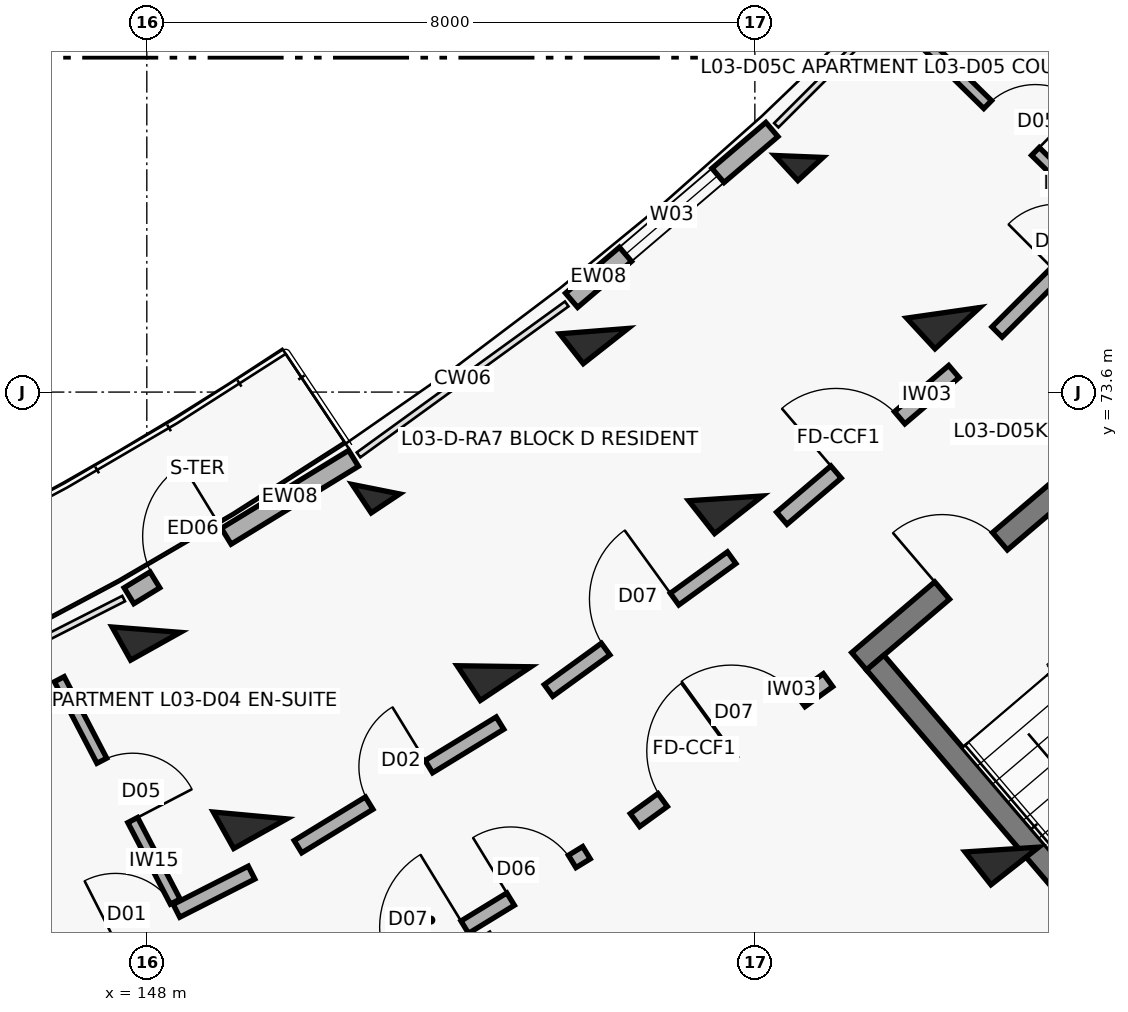
"""IFC4 building model, lengths in metres.
Left out: names, types, materials, properties, quantities, classifications, styles, units other than length and angle.
Written with IfcOpenShell. Run it as: python <this file> out.ifc"""

import sys

from ifc_helpers import new_model, si_unit, direction, frame, frame_2d, origin, origin_2d, place, context, subcontext, project, spatial, rectangle, extrude, element, fill, save


model = new_model("IFC4")
c1 = context("Model", 3, precision=1e-05, world=origin(), true_north=direction((0.0, 1.0)))
c2 = subcontext(c1, "Body", "Model", "MODEL_VIEW")
j1 = project(units=[si_unit("LENGTHUNIT", "METRE"), si_unit("PLANEANGLEUNIT", "RADIAN")], contexts=[c1])
p1 = place(None, origin())
s1 = spatial("IfcSite", under=j1, at=p1, CompositionType="ELEMENT")
p2 = place(p1, origin())
s2 = spatial("IfcBuilding", under=s1, at=p2, CompositionType="ELEMENT")
p3 = place(p2, frame((0.0, 0.0, 11.2)))
s3 = spatial("IfcBuildingStorey", under=s2, at=p3, CompositionType="ELEMENT", Elevation=11.2)
p4 = place(p3, frame((147.992, 70.474, 0.0), z_axis=(0.0, 0.0, 1.0), x_axis=(0.487859659139, -0.87292207727, 0.0)))
e1 = element("IfcColumn", 1, at=p4, inside=s3, PredefinedType="COLUMN", context=c2, shape_type="SweptSolid", body=[
    extrude(rectangle(XDim=0.5, YDim=0.75, at=origin_2d()), origin(), (0.0, 0.0, 1.0), 3.1),
])
p5 = place(p3, frame((149.358, 68.03, 0.0), z_axis=(0.0, 0.0, 1.0), x_axis=(0.487859659139, -0.87292207727, 0.0)))
e2 = element("IfcColumn", 2, at=p5, inside=s3, PredefinedType="COLUMN", context=c2, shape_type="SweptSolid", body=[
    extrude(rectangle(XDim=0.55, YDim=0.8, at=origin_2d()), origin(), (0.0, 0.0, 1.0), 3.1),
])
p6 = place(p3, frame((151.015, 72.322, 0.0), z_axis=(0.0, 0.0, 1.0), x_axis=(0.554844427448, -0.83195412213, 0.0)))
e3 = element("IfcColumn", 3, at=p6, inside=s3, PredefinedType="COLUMN", context=c2, shape_type="SweptSolid", body=[
    extrude(rectangle(XDim=0.45, YDim=0.45, at=origin_2d()), origin(), (0.0, 0.0, 1.0), 3.1),
])
p7 = place(p3, frame((152.568, 69.993, 0.0), z_axis=(0.0, 0.0, 1.0), x_axis=(0.554844427448, -0.83195412213, 0.0)))
e4 = element("IfcColumn", 4, at=p7, inside=s3, PredefinedType="COLUMN", context=c2, shape_type="SweptSolid", body=[
    extrude(rectangle(XDim=0.55, YDim=0.8, at=origin_2d()), origin(), (0.0, 0.0, 1.0), 3.1),
])
p8 = place(p3, frame((153.883, 74.402, 0.0), z_axis=(0.0, 0.0, 1.0), x_axis=(0.618408395358, -0.785856893175, 0.0)))
e5 = element("IfcColumn", 5, at=p8, inside=s3, PredefinedType="COLUMN", context=c2, shape_type="SweptSolid", body=[
    extrude(rectangle(XDim=0.5, YDim=0.75, at=origin_2d()), origin(), (0.0, 0.0, 1.0), 3.1),
])
for number, where, z_axis, x_axis in (
    (6, (155.614, 72.202, 0.0), (0.0, 0.0, 1.0), (0.618, -0.786, 0.0)),
    (7, (159.25, 67.581, 0.0), (0.0, 0.0, 1.0), (0.618, -0.786, 0.0)),
):
    element("IfcColumn", number, at=place(p3, frame(where, z_axis=z_axis, x_axis=x_axis)), inside=s3, PredefinedType="COLUMN", context=c2, shape_type="SweptSolid", body=[
        extrude(rectangle(XDim=0.55, YDim=0.8, at=origin_2d()), origin(), (0.0, 0.0, 1.0), 3.1),
    ])
p9 = place(p3, frame((156.579, 76.701, 0.0), z_axis=(0.0, 0.0, 1.0), x_axis=(0.678159669868, -0.73491459515, 0.0)))
e8 = element("IfcColumn", 8, at=p9, inside=s3, PredefinedType="COLUMN", context=c2, shape_type="SweptSolid", body=[
    extrude(rectangle(XDim=0.45, YDim=0.45, at=origin_2d()), origin(), (0.0, 0.0, 1.0), 3.1),
])
p10 = place(p3, frame((158.477, 74.643, 0.0), z_axis=(0.0, 0.0, 1.0), x_axis=(0.678159669868, -0.73491459515, 0.0)))
e9 = element("IfcColumn", 9, at=p10, inside=s3, PredefinedType="COLUMN", context=c2, shape_type="SweptSolid", body=[
    extrude(rectangle(XDim=0.55, YDim=0.8, at=origin_2d()), origin(), (0.0, 0.0, 1.0), 3.1),
])
p11 = place(p3, frame((147.765, 70.921, 0.0), z_axis=(0.0, 0.0, 1.0), x_axis=(0.85310231885, 0.521743647371, 0.0)))
e10 = element("IfcWall", 10, at=p11, inside=s3, PredefinedType="SOLIDWALL", context=c2, shape_type="SweptSolid", body=[
    extrude(rectangle(XDim=3.464, YDim=0.245, at=frame_2d((1.732, 0.0))), origin(), (0.0, 0.0, 1.0), 2.25),
])
p12 = place(p11, frame((0.4, 0.0, 0.0)))
e11 = element("IfcOpeningElement", 11, at=p12, cuts=e10, PredefinedType="OPENING", context=c2, shape_type="SweptSolid", body=[
    extrude(rectangle(XDim=1.1, YDim=2.15, at=frame_2d((0.55, 1.075))), frame((0.0, 0.133, 0.0), z_axis=(0.0, -1.0, 0.0), x_axis=(1.0, 0.0, 0.0)), (0.0, 0.0, 1.0), 0.265),
])
p13 = place(p3, frame((153.589, 74.808, 0.0), z_axis=(0.0, 0.0, 1.0), x_axis=(0.760985425115, 0.648768974876, 0.0)))
e12 = element("IfcWall", 12, at=p13, inside=s3, PredefinedType="SOLIDWALL", context=c2, shape_type="SweptSolid", body=[
    extrude(rectangle(XDim=3.464, YDim=0.245, at=frame_2d((1.732, 0.0))), origin(), (0.0, 0.0, 1.0), 2.25),
])
p14 = place(p13, frame((0.932, 0.0, 0.32)))
e13 = element("IfcOpeningElement", 13, at=p14, cuts=e12, PredefinedType="OPENING", context=c2, shape_type="SweptSolid", body=[
    extrude(rectangle(XDim=1.6, YDim=1.5, at=frame_2d((0.8, 0.75))), frame((0.0, 0.133, 0.0), z_axis=(0.0, -1.0, 0.0), x_axis=(1.0, 0.0, 0.0)), (0.0, 0.0, 1.0), 0.265),
])
p15 = place(p3, frame((159.262, 79.041, 0.0), z_axis=(0.0, 0.0, 1.0), x_axis=(0.733738684326, -0.679431779595, 0.0)))
e14 = element("IfcWall", 14, at=p15, inside=s3, PredefinedType="SOLIDWALL", context=c2, shape_type="SweptSolid", body=[
    extrude(rectangle(XDim=8.2, YDim=0.265, at=frame_2d((4.1, 0.0))), origin(), (0.0, 0.0, 1.0), 2.08),
])
p16 = place(p15, frame((3.59, 0.0, 0.75)))
e15 = element("IfcOpeningElement", 15, at=p16, cuts=e14, PredefinedType="OPENING", context=c2, shape_type="SweptSolid", body=[
    extrude(rectangle(XDim=1.35, YDim=1.35, at=frame_2d((0.675, 0.675))), frame((0.0, 0.142, 0.0), z_axis=(0.0, -1.0, 0.0), x_axis=(1.0, 0.0, 0.0)), (0.0, 0.0, 1.0), 0.285),
])
p17 = place(p3, frame((157.372, 70.058, 0.0), z_axis=(0.0, 0.0, 1.0), x_axis=(0.760990583254, 0.648762924495, 0.0)))
e16 = element("IfcWall", 16, at=p17, inside=s3, PredefinedType="SHEAR", context=c2, shape_type="SweptSolid", body=[
    extrude(rectangle(XDim=3.87, YDim=0.3, at=frame_2d((1.935, 0.0))), origin(), (0.0, 0.0, 1.0), 3.1),
])
p18 = place(p17, frame((1.435, 0.0, 0.0)))
e17 = element("IfcOpeningElement", 17, at=p18, cuts=e16, PredefinedType="OPENING", context=c2, shape_type="SweptSolid", body=[
    extrude(rectangle(XDim=1.0, YDim=2.15, at=frame_2d((0.5, 1.075))), frame((0.0, 0.16, 0.0), z_axis=(0.0, -1.0, 0.0), x_axis=(1.0, 0.0, 0.0)), (0.0, 0.0, 1.0), 0.32),
])
p19 = place(p3, frame((157.583, 70.041, 0.0), z_axis=(0.0, 0.0, 1.0), x_axis=(0.648762810187, -0.760990680704, 0.0)))
e18 = element("IfcWall", 18, at=p19, inside=s3, PredefinedType="SHEAR", context=c2, shape_type="SweptSolid", body=[
    extrude(rectangle(XDim=7.69, YDim=0.3, at=frame_2d((3.845, 0.0))), origin(), (0.0, 0.0, 1.0), 3.1),
])
p20 = place(p3, frame((146.6, 65.865, 0.0), z_axis=(0.0, 0.0, 1.0), x_axis=(0.891414101388, 0.453189695212, 0.0)))
e19 = element("IfcWall", 19, at=p20, inside=s3, PredefinedType="SOLIDWALL", context=c2, shape_type="SweptSolid", body=[
    extrude(rectangle(XDim=3.116, YDim=0.19, at=frame_2d((1.558, 0.0))), origin(), (0.0, 0.0, 1.0), 2.08),
])
p21 = place(p20, frame((1.108, 0.0, 0.0)))
e20 = element("IfcOpeningElement", 20, at=p21, cuts=e19, PredefinedType="OPENING", context=c2, shape_type="SweptSolid", body=[
    extrude(rectangle(XDim=0.9, YDim=2.1, at=frame_2d((0.45, 1.05))), frame((0.0, 0.105, 0.0), z_axis=(0.0, -1.0, 0.0), x_axis=(1.0, 0.0, 0.0)), (0.0, 0.0, 1.0), 0.21),
])
p22 = place(p3, frame((146.849, 69.822, 0.0), z_axis=(0.0, 0.0, 1.0), x_axis=(0.462242343884, -0.886753638572, 0.0)))
e21 = element("IfcWall", 21, at=p22, inside=s3, PredefinedType="PARTITIONING", context=c2, shape_type="SweptSolid", body=[
    extrude(rectangle(XDim=3.3, YDim=0.145, at=frame_2d((1.65, 0.0))), origin(), (0.0, 0.0, 1.0), 2.08),
])
p23 = place(p22, frame((1.21, 0.0, 0.0)))
e22 = element("IfcOpeningElement", 22, at=p23, cuts=e21, PredefinedType="OPENING", context=c2, shape_type="SweptSolid", body=[
    extrude(rectangle(XDim=0.88, YDim=2.1, at=frame_2d((0.44, 1.05))), frame((0.0, 0.083, 0.0), z_axis=(0.0, -1.0, 0.0), x_axis=(1.0, 0.0, 0.0)), (0.0, 0.0, 1.0), 0.165),
])
p24 = place(p3, frame((150.989, 65.829, 0.0), z_axis=(0.0, 0.0, 1.0), x_axis=(0.853090237845, 0.521763400492, 0.0)))
e23 = element("IfcWall", 23, at=p24, inside=s3, PredefinedType="SOLIDWALL", context=c2, shape_type="SweptSolid", body=[
    extrude(rectangle(XDim=3.277, YDim=0.19, at=frame_2d((1.638, 0.0))), origin(), (0.0, 0.0, 1.0), 2.08),
])
p25 = place(p24, frame((0.28, 0.0, 0.0)))
e24 = element("IfcOpeningElement", 24, at=p25, cuts=e23, PredefinedType="OPENING", context=c2, shape_type="SweptSolid", body=[
    extrude(rectangle(XDim=1.12, YDim=2.15, at=frame_2d((0.56, 1.075))), frame((0.0, 0.105, 0.0), z_axis=(0.0, -1.0, 0.0), x_axis=(1.0, 0.0, 0.0)), (0.0, 0.0, 1.0), 0.21),
])
p26 = place(p24, frame((2.107, 0.0, 0.0)))
e25 = element("IfcOpeningElement", 25, at=p26, cuts=e23, PredefinedType="OPENING", context=c2, shape_type="SweptSolid", body=[
    extrude(rectangle(XDim=0.95, YDim=2.1, at=frame_2d((0.475, 1.05))), frame((0.0, 0.105, 0.0), z_axis=(0.0, -1.0, 0.0), x_axis=(1.0, 0.0, 0.0)), (0.0, 0.0, 1.0), 0.21),
])
p27 = place(p3, frame((149.989, 67.619, 0.0), z_axis=(0.0, 0.0, 1.0), x_axis=(0.853121049608, 0.5217130195, 0.0)))
e26 = element("IfcWall", 26, at=p27, inside=s3, PredefinedType="SOLIDWALL", context=c2, shape_type="SweptSolid", body=[
    extrude(rectangle(XDim=3.116, YDim=0.19, at=frame_2d((1.558, 0.0))), origin(), (0.0, 0.0, 1.0), 2.08),
])
p28 = place(p27, frame((1.098, 0.0, 0.0)))
e27 = element("IfcOpeningElement", 27, at=p28, cuts=e26, PredefinedType="OPENING", context=c2, shape_type="SweptSolid", body=[
    extrude(rectangle(XDim=0.92, YDim=2.1, at=frame_2d((0.46, 1.05))), frame((0.0, 0.105, 0.0), z_axis=(0.0, -1.0, 0.0), x_axis=(1.0, 0.0, 0.0)), (0.0, 0.0, 1.0), 0.21),
])
p29 = place(p3, frame((154.423, 67.968, 0.0), z_axis=(0.0, 0.0, 1.0), x_axis=(0.809516127005, 0.587097641043, 0.0)))
e28 = element("IfcWall", 28, at=p29, inside=s3, PredefinedType="SOLIDWALL", context=c2, shape_type="SweptSolid", body=[
    extrude(rectangle(XDim=3.137, YDim=0.21, at=frame_2d((1.569, 0.0))), origin(), (0.0, 0.0, 1.0), 2.08),
])
p30 = place(p29, frame((0.45, 0.0, 0.0)))
e29 = element("IfcOpeningElement", 29, at=p30, cuts=e28, PredefinedType="OPENING", context=c2, shape_type="SweptSolid", body=[
    extrude(rectangle(XDim=1.1, YDim=2.15, at=frame_2d((0.55, 1.075))), frame((0.0, 0.115, 0.0), z_axis=(0.0, -1.0, 0.0), x_axis=(1.0, 0.0, 0.0)), (0.0, 0.0, 1.0), 0.23),
])
p31 = place(p29, frame((1.567, 0.0, 0.0)))
e30 = element("IfcOpeningElement", 30, at=p31, cuts=e28, PredefinedType="OPENING", context=c2, shape_type="SweptSolid", body=[
    extrude(rectangle(XDim=1.12, YDim=2.15, at=frame_2d((0.56, 1.075))), frame((0.0, 0.115, 0.0), z_axis=(0.0, -1.0, 0.0), x_axis=(1.0, 0.0, 0.0)), (0.0, 0.0, 1.0), 0.23),
])
p32 = place(p3, frame((153.285, 69.674, 0.0), z_axis=(0.0, 0.0, 1.0), x_axis=(0.809505174959, 0.587112741911, 0.0)))
e31 = element("IfcWall", 31, at=p32, inside=s3, PredefinedType="SOLIDWALL", context=c2, shape_type="SweptSolid", body=[
    extrude(rectangle(XDim=2.976, YDim=0.19, at=frame_2d((1.488, 0.0))), origin(), (0.0, 0.0, 1.0), 2.08),
])
p33 = place(p32, frame((0.928, 0.0, 0.0)))
e32 = element("IfcOpeningElement", 32, at=p33, cuts=e31, PredefinedType="OPENING", context=c2, shape_type="SweptSolid", body=[
    extrude(rectangle(XDim=1.12, YDim=2.15, at=frame_2d((0.56, 1.075))), frame((0.0, 0.105, 0.0), z_axis=(0.0, -1.0, 0.0), x_axis=(1.0, 0.0, 0.0)), (0.0, 0.0, 1.0), 0.21),
])
p34 = place(p3, frame((156.354, 71.94, 0.0), z_axis=(0.0, 0.0, 1.0), x_axis=(0.760991187621, 0.648762215579, 0.0)))
e33 = element("IfcWall", 33, at=p34, inside=s3, PredefinedType="SOLIDWALL", context=c2, shape_type="SweptSolid", body=[
    extrude(rectangle(XDim=2.976, YDim=0.21, at=frame_2d((1.488, 0.0))), origin(), (0.0, 0.0, 1.0), 2.08),
])
p35 = place(p34, frame((0.938, 0.0, 0.0)))
e34 = element("IfcOpeningElement", 34, at=p35, cuts=e33, PredefinedType="OPENING", context=c2, shape_type="SweptSolid", body=[
    extrude(rectangle(XDim=1.1, YDim=2.15, at=frame_2d((0.55, 1.075))), frame((0.0, 0.115, 0.0), z_axis=(0.0, -1.0, 0.0), x_axis=(1.0, 0.0, 0.0)), (0.0, 0.0, 1.0), 0.23),
])
p36 = place(p3, frame((159.186, 74.39, 0.0), z_axis=(0.0, 0.0, 1.0), x_axis=(0.70773330139, 0.706479705373, 0.0)))
e35 = element("IfcWall", 35, at=p36, inside=s3, PredefinedType="SOLIDWALL", context=c2, shape_type="SweptSolid", body=[
    extrude(rectangle(XDim=3.116, YDim=0.19, at=frame_2d((1.558, 0.0))), origin(), (0.0, 0.0, 1.0), 2.08),
])
p37 = place(p36, frame((1.108, 0.0, 0.0)))
e36 = element("IfcOpeningElement", 36, at=p37, cuts=e35, PredefinedType="OPENING", context=c2, shape_type="SweptSolid", body=[
    extrude(rectangle(XDim=0.9, YDim=2.1, at=frame_2d((0.45, 1.05))), frame((0.0, 0.105, 0.0), z_axis=(0.0, -1.0, 0.0), x_axis=(1.0, 0.0, 0.0)), (0.0, 0.0, 1.0), 0.21),
])
p38 = place(p3, frame((158.2, 78.23, 0.0), z_axis=(0.0, 0.0, 1.0), x_axis=(0.713587506757, -0.700566106945, 0.0)))
e37 = element("IfcWall", 37, at=p38, inside=s3, PredefinedType="PARTITIONING", context=c2, shape_type="SweptSolid", body=[
    extrude(rectangle(XDim=3.3, YDim=0.145, at=frame_2d((1.65, 0.0))), origin(), (0.0, 0.0, 1.0), 2.08),
])
p39 = place(p38, frame((1.21, 0.0, 0.0)))
e38 = element("IfcOpeningElement", 38, at=p39, cuts=e37, PredefinedType="OPENING", context=c2, shape_type="SweptSolid", body=[
    extrude(rectangle(XDim=0.88, YDim=2.1, at=frame_2d((0.44, 1.05))), frame((0.0, 0.083, 0.0), z_axis=(0.0, -1.0, 0.0), x_axis=(1.0, 0.0, 0.0)), (0.0, 0.0, 1.0), 0.165),
])
p40 = place(p12, origin())
e39 = element("IfcDoor", 39, at=p40, inside=s3, OperationType="SINGLE_SWING_RIGHT", PredefinedType="DOOR", context=c2, shape_type="SweptSolid", body=[
    extrude(rectangle(XDim=1.1, YDim=2.15, at=frame_2d((0.55, 1.075))), frame((0.0, 0.025, 0.0), z_axis=(0.0, -1.0, 0.0), x_axis=(1.0, 0.0, 0.0)), (0.0, 0.0, 1.0), 0.05),
])
fill(e11, e39)
p41 = place(p14, origin())
e40 = element("IfcWindow", 40, at=p41, inside=s3, PartitioningType="DOUBLE_PANEL_VERTICAL", PredefinedType="WINDOW", context=c2, shape_type="SweptSolid", body=[
    extrude(rectangle(XDim=1.6, YDim=1.5, at=frame_2d((0.8, 0.75))), frame((0.0, 0.03, 0.0), z_axis=(0.0, -1.0, 0.0), x_axis=(1.0, 0.0, 0.0)), (0.0, 0.0, 1.0), 0.06),
])
fill(e13, e40)
p42 = place(p18, origin())
e41 = element("IfcDoor", 41, at=p42, inside=s3, OperationType="SINGLE_SWING_LEFT", PredefinedType="DOOR", context=c2, shape_type="SweptSolid", body=[
    extrude(rectangle(XDim=1.0, YDim=2.15, at=frame_2d((0.5, 1.075))), frame((0.0, 0.025, 0.0), z_axis=(0.0, -1.0, 0.0), x_axis=(1.0, 0.0, 0.0)), (0.0, 0.0, 1.0), 0.05),
])
fill(e17, e41)
p43 = place(p21, origin())
e42 = element("IfcDoor", 42, at=p43, inside=s3, OperationType="SINGLE_SWING_LEFT", PredefinedType="DOOR", context=c2, shape_type="SweptSolid", body=[
    extrude(rectangle(XDim=0.9, YDim=2.1, at=frame_2d((0.45, 1.05))), frame((0.0, 0.025, 0.0), z_axis=(0.0, -1.0, 0.0), x_axis=(1.0, 0.0, 0.0)), (0.0, 0.0, 1.0), 0.05),
])
fill(e20, e42)
p44 = place(p23, origin())
e43 = element("IfcDoor", 43, at=p44, inside=s3, OperationType="SINGLE_SWING_RIGHT", PredefinedType="DOOR", context=c2, shape_type="SweptSolid", body=[
    extrude(rectangle(XDim=0.88, YDim=2.1, at=frame_2d((0.44, 1.05))), frame((0.0, 0.025, 0.0), z_axis=(0.0, -1.0, 0.0), x_axis=(1.0, 0.0, 0.0)), (0.0, 0.0, 1.0), 0.05),
])
fill(e22, e43)
p45 = place(p25, origin())
e44 = element("IfcDoor", 44, at=p45, inside=s3, OperationType="SINGLE_SWING_RIGHT", PredefinedType="DOOR", context=c2, shape_type="SweptSolid", body=[
    extrude(rectangle(XDim=1.12, YDim=2.15, at=frame_2d((0.56, 1.075))), frame((0.0, 0.025, 0.0), z_axis=(0.0, -1.0, 0.0), x_axis=(1.0, 0.0, 0.0)), (0.0, 0.0, 1.0), 0.05),
])
fill(e24, e44)
p46 = place(p26, origin())
e45 = element("IfcDoor", 45, at=p46, inside=s3, OperationType="SINGLE_SWING_LEFT", PredefinedType="DOOR", context=c2, shape_type="SweptSolid", body=[
    extrude(rectangle(XDim=0.95, YDim=2.1, at=frame_2d((0.475, 1.05))), frame((0.0, 0.025, 0.0), z_axis=(0.0, -1.0, 0.0), x_axis=(1.0, 0.0, 0.0)), (0.0, 0.0, 1.0), 0.05),
])
fill(e25, e45)
p47 = place(p28, origin())
e46 = element("IfcDoor", 46, at=p47, inside=s3, OperationType="SINGLE_SWING_RIGHT", PredefinedType="DOOR", context=c2, shape_type="SweptSolid", body=[
    extrude(rectangle(XDim=0.92, YDim=2.1, at=frame_2d((0.46, 1.05))), frame((0.0, 0.025, 0.0), z_axis=(0.0, -1.0, 0.0), x_axis=(1.0, 0.0, 0.0)), (0.0, 0.0, 1.0), 0.05),
])
fill(e27, e46)
p48 = place(p30, origin())
e47 = element("IfcDoor", 47, at=p48, inside=s3, OperationType="SINGLE_SWING_RIGHT", PredefinedType="DOOR", context=c2, shape_type="SweptSolid", body=[
    extrude(rectangle(XDim=1.1, YDim=2.15, at=frame_2d((0.55, 1.075))), frame((0.0, 0.025, 0.0), z_axis=(0.0, -1.0, 0.0), x_axis=(1.0, 0.0, 0.0)), (0.0, 0.0, 1.0), 0.05),
])
fill(e29, e47)
p49 = place(p31, origin())
e48 = element("IfcDoor", 48, at=p49, inside=s3, OperationType="SINGLE_SWING_LEFT", PredefinedType="DOOR", context=c2, shape_type="SweptSolid", body=[
    extrude(rectangle(XDim=1.12, YDim=2.15, at=frame_2d((0.56, 1.075))), frame((0.0, 0.025, 0.0), z_axis=(0.0, -1.0, 0.0), x_axis=(1.0, 0.0, 0.0)), (0.0, 0.0, 1.0), 0.05),
])
fill(e30, e48)
p50 = place(p33, origin())
e49 = element("IfcDoor", 49, at=p50, inside=s3, OperationType="SINGLE_SWING_RIGHT", PredefinedType="DOOR", context=c2, shape_type="SweptSolid", body=[
    extrude(rectangle(XDim=1.12, YDim=2.15, at=frame_2d((0.56, 1.075))), frame((0.0, 0.025, 0.0), z_axis=(0.0, -1.0, 0.0), x_axis=(1.0, 0.0, 0.0)), (0.0, 0.0, 1.0), 0.05),
])
fill(e32, e49)
p51 = place(p35, origin())
e50 = element("IfcDoor", 50, at=p51, inside=s3, OperationType="SINGLE_SWING_LEFT", PredefinedType="DOOR", context=c2, shape_type="SweptSolid", body=[
    extrude(rectangle(XDim=1.1, YDim=2.15, at=frame_2d((0.55, 1.075))), frame((0.0, 0.025, 0.0), z_axis=(0.0, -1.0, 0.0), x_axis=(1.0, 0.0, 0.0)), (0.0, 0.0, 1.0), 0.05),
])
fill(e34, e50)
p52 = place(p39, origin())
e51 = element("IfcDoor", 51, at=p52, inside=s3, OperationType="SINGLE_SWING_RIGHT", PredefinedType="DOOR", context=c2, shape_type="SweptSolid", body=[
    extrude(rectangle(XDim=0.88, YDim=2.1, at=frame_2d((0.44, 1.05))), frame((0.0, 0.025, 0.0), z_axis=(0.0, -1.0, 0.0), x_axis=(1.0, 0.0, 0.0)), (0.0, 0.0, 1.0), 0.05),
])
fill(e38, e51)
save(model, sys.argv[1])
